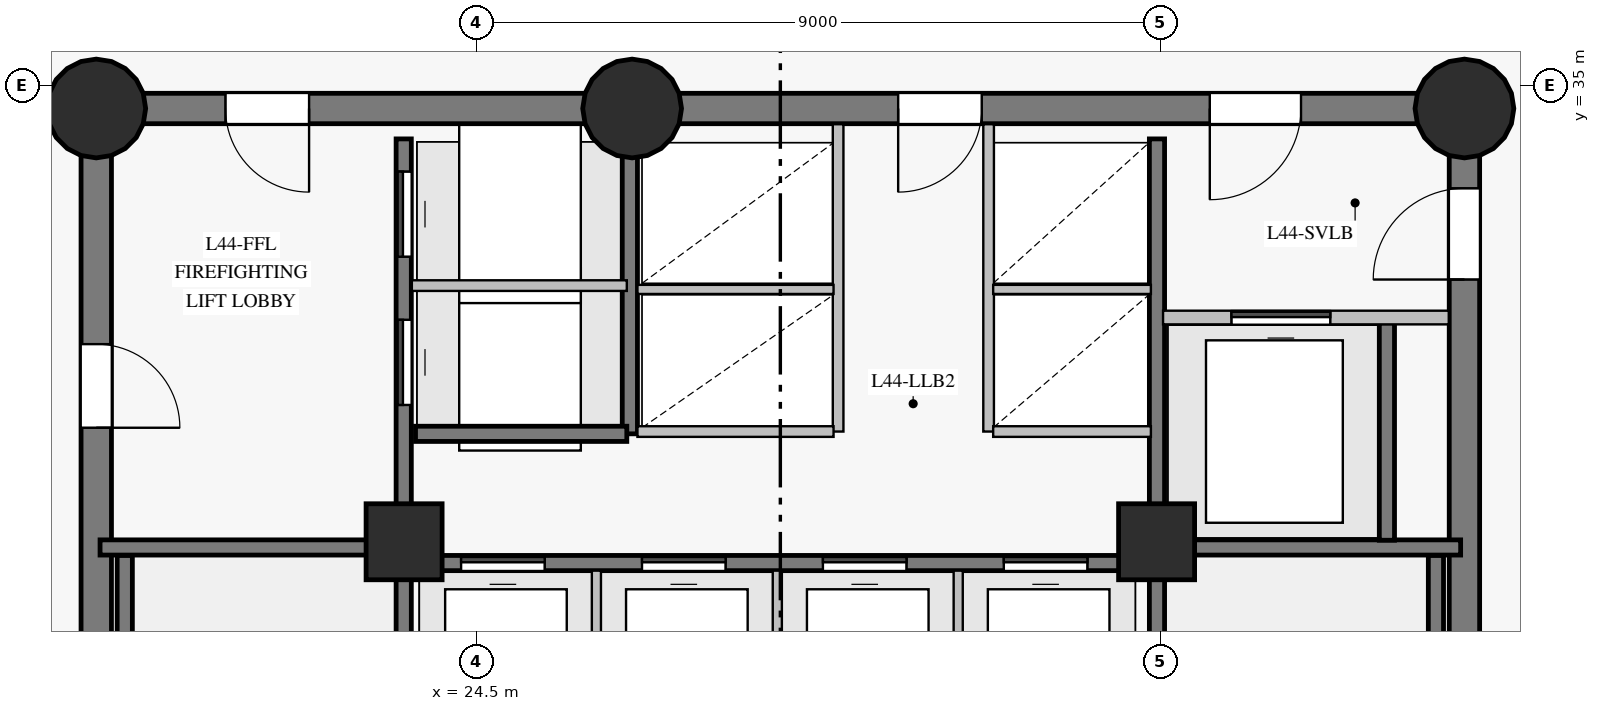
"""IFC4 building model, lengths in metres.
Left out: names, types, materials, properties, quantities, classifications, styles, units other than length and angle.
Written with IfcOpenShell. Run it as: python <this file> out.ifc"""

import sys

from ifc_helpers import new_model, si_unit, direction, frame, frame_2d, origin, origin_with_axes, origin_2d, place, context, subcontext, project, spatial, rectangle, circle, extrude, source, transform, mapped, element, fill, save


model = new_model("IFC4")
c1 = context("Model", 3, precision=1e-05, world=origin(), true_north=direction((0.0, 1.0)))
c2 = subcontext(c1, "Body", "Model", "MODEL_VIEW")
j1 = project(units=[si_unit("LENGTHUNIT", "METRE"), si_unit("PLANEANGLEUNIT", "RADIAN")], contexts=[c1])
p1 = place(None, origin())
s1 = spatial("IfcSite", under=j1, at=p1, CompositionType="ELEMENT")
p2 = place(p1, origin())
s2 = spatial("IfcBuilding", under=s1, at=p2, CompositionType="ELEMENT")
p3 = place(p2, frame((0.0, 0.0, 156.55)))
s3 = spatial("IfcBuildingStorey", under=s2, at=p3, CompositionType="ELEMENT", Elevation=156.55)
p4 = place(p3, frame((37.5, 18.3, 0.0), z_axis=(0.0, 0.0, 1.0), x_axis=(0.0, 1.0, 0.0)))
e1 = element("IfcWall", 1, at=p4, inside=s3, PredefinedType="SHEAR", context=c2, shape_type="SweptSolid", body=[
    extrude(rectangle(XDim=16.4, YDim=0.4, at=frame_2d((8.2, 0.0))), origin(), (0.0, 0.0, 1.0), 2.825),
])
p5 = place(p4, frame((14.15, 0.0, 0.0)))
e2 = element("IfcOpeningElement", 2, at=p5, cuts=e1, PredefinedType="OPENING", context=c2, shape_type="SweptSolid", body=[
    extrude(rectangle(XDim=1.2, YDim=2.15, at=frame_2d((0.6, 1.075))), frame((0.0, 0.21, 0.0), z_axis=(0.0, -1.0, 0.0), x_axis=(1.0, 0.0, 0.0)), (0.0, 0.0, 1.0), 0.42),
])
p6 = place(p3, frame((37.5, 34.7, 0.0), z_axis=(0.0, 0.0, 1.0), x_axis=(-1.0, 0.0, 0.0)))
e3 = element("IfcWall", 3, at=p6, inside=s3, PredefinedType="SHEAR", context=c2, shape_type="SweptSolid", body=[
    extrude(rectangle(XDim=10.95, YDim=0.4, at=frame_2d((5.475, 0.0))), origin(), (0.0, 0.0, 1.0), 2.825),
])
p7 = place(p6, frame((2.15, 0.0, 0.0)))
e4 = element("IfcOpeningElement", 4, at=p7, cuts=e3, PredefinedType="OPENING", context=c2, shape_type="SweptSolid", body=[
    extrude(rectangle(XDim=1.2, YDim=2.15, at=frame_2d((0.6, 1.075))), frame((0.0, 0.21, 0.0), z_axis=(0.0, -1.0, 0.0), x_axis=(1.0, 0.0, 0.0)), (0.0, 0.0, 1.0), 0.42),
])
p8 = place(p6, frame((6.35, 0.0, 0.0)))
e5 = element("IfcOpeningElement", 5, at=p8, cuts=e3, PredefinedType="OPENING", context=c2, shape_type="SweptSolid", body=[
    extrude(rectangle(XDim=1.1, YDim=2.15, at=frame_2d((0.55, 1.075))), frame((0.0, 0.21, 0.0), z_axis=(0.0, -1.0, 0.0), x_axis=(1.0, 0.0, 0.0)), (0.0, 0.0, 1.0), 0.42),
])
p9 = place(p3, frame((26.55, 34.7, 0.0), z_axis=(0.0, 0.0, 1.0), x_axis=(-1.0, 0.0, 0.0)))
e6 = element("IfcWall", 6, at=p9, inside=s3, PredefinedType="SHEAR", context=c2, shape_type="SweptSolid", body=[
    extrude(rectangle(XDim=7.05, YDim=0.4, at=frame_2d((3.525, 0.0))), origin(), (0.0, 0.0, 1.0), 2.825),
])
p10 = place(p9, frame((4.25, 0.0, 0.0)))
e7 = element("IfcOpeningElement", 7, at=p10, cuts=e6, PredefinedType="OPENING", context=c2, shape_type="SweptSolid", body=[
    extrude(rectangle(XDim=1.1, YDim=2.15, at=frame_2d((0.55, 1.075))), frame((0.0, 0.21, 0.0), z_axis=(0.0, -1.0, 0.0), x_axis=(1.0, 0.0, 0.0)), (0.0, 0.0, 1.0), 0.42),
])
p11 = place(p3, frame((19.5, 34.7, 0.0), z_axis=(0.0, 0.0, 1.0), x_axis=(0.0, -1.0, 0.0)))
e8 = element("IfcWall", 8, at=p11, inside=s3, PredefinedType="SHEAR", context=c2, shape_type="SweptSolid", body=[
    extrude(rectangle(XDim=16.4, YDim=0.4, at=frame_2d((8.2, 0.0))), origin(), (0.0, 0.0, 1.0), 2.825),
])
p12 = place(p11, frame((3.1, 0.0, 0.0)))
e9 = element("IfcOpeningElement", 9, at=p12, cuts=e8, PredefinedType="OPENING", context=c2, shape_type="SweptSolid", body=[
    extrude(rectangle(XDim=1.1, YDim=2.15, at=frame_2d((0.55, 1.075))), frame((0.0, 0.21, 0.0), z_axis=(0.0, -1.0, 0.0), x_axis=(1.0, 0.0, 0.0)), (0.0, 0.0, 1.0), 0.42),
])
m1 = source(origin_with_axes(), c2, "Body", "SweptSolid", [
    extrude(circle(Radius=0.65, at=origin_2d()), origin(), (0.0, 0.0, 1.0), 3.05),
])
for number, where, z_axis, x_axis in (
    (10, (19.5, 34.7, 0.0), (0.0, 0.0, 1.0), (1.0, 0.0, 0.0)),
    (11, (26.55, 34.7, 0.0), (0.0, 0.0, 1.0), (1.0, 0.0, 0.0)),
    (12, (37.5, 34.7, 0.0), (0.0, 0.0, 1.0), (1.0, 0.0, 0.0)),
):
    element("IfcColumn", number, at=place(p3, frame(where, z_axis=z_axis, x_axis=x_axis)), inside=s3, PredefinedType="COLUMN", context=c2, shape_type="MappedRepresentation", body=[
        mapped(m1, transform((0.0, 0.0, 0.0), scale=1.0)),
    ])
m2 = source(origin_with_axes(), c2, "Body", "SweptSolid", [
    extrude(rectangle(XDim=1.0, YDim=1.0, at=origin_2d()), origin(), (0.0, 0.0, 1.0), 3.05),
])
for number, where, z_axis, x_axis in (
    (13, (23.55, 29.0, 0.0), (0.0, 0.0, 1.0), (1.0, 0.0, 0.0)),
    (14, (33.45, 29.0, 0.0), (0.0, 0.0, 1.0), (1.0, 0.0, 0.0)),
):
    element("IfcColumn", number, at=place(p3, frame(where, z_axis=z_axis, x_axis=x_axis)), inside=s3, PredefinedType="COLUMN", context=c2, shape_type="MappedRepresentation", body=[
        mapped(m2, transform((0.0, 0.0, 0.0), scale=1.0)),
    ])
p13 = place(p3, frame((23.545, 18.7, 0.0), z_axis=(0.0, 0.0, 1.0), x_axis=(0.0, 1.0, 0.0)))
e15 = element("IfcWall", 15, at=p13, inside=s3, PredefinedType="SHEAR", context=c2, shape_type="SweptSolid", body=[
    extrude(rectangle(XDim=15.6, YDim=0.2, at=frame_2d((7.8, 0.0))), origin(), (0.0, 0.0, 1.0), 2.825),
])
p14 = place(p13, frame((2.75, 0.0, 0.0)))
e16 = element("IfcOpeningElement", 16, at=p14, cuts=e15, PredefinedType="OPENING", context=c2, shape_type="SweptSolid", body=[
    extrude(rectangle(XDim=1.15, YDim=2.15, at=frame_2d((0.575, 1.075))), frame((0.0, 0.11, 0.0), z_axis=(0.0, -1.0, 0.0), x_axis=(1.0, 0.0, 0.0)), (0.0, 0.0, 1.0), 0.22),
])
p15 = place(p13, frame((0.14, 0.0, 0.0)))
e17 = element("IfcOpeningElement", 17, at=p15, cuts=e15, PredefinedType="OPENING", context=c2, shape_type="SweptSolid", body=[
    extrude(rectangle(XDim=0.88, YDim=2.1, at=frame_2d((0.44, 1.05))), frame((0.0, 0.11, 0.0), z_axis=(0.0, -1.0, 0.0), x_axis=(1.0, 0.0, 0.0)), (0.0, 0.0, 1.0), 0.22),
])
p16 = place(p13, frame((1.36, 0.0, 0.0)))
e18 = element("IfcOpeningElement", 18, at=p16, cuts=e15, PredefinedType="OPENING", context=c2, shape_type="SweptSolid", body=[
    extrude(rectangle(XDim=0.88, YDim=2.1, at=frame_2d((0.44, 1.05))), frame((0.0, 0.11, 0.0), z_axis=(0.0, -1.0, 0.0), x_axis=(1.0, 0.0, 0.0)), (0.0, 0.0, 1.0), 0.22),
])
p17 = place(p13, frame((12.1, 0.0, 0.0)))
e19 = element("IfcOpeningElement", 19, at=p17, cuts=e15, PredefinedType="OPENING", context=c2, shape_type="SweptSolid", body=[
    extrude(rectangle(XDim=1.12, YDim=2.15, at=frame_2d((0.56, 1.075))), frame((0.0, 0.11, 0.0), z_axis=(0.0, -1.0, 0.0), x_axis=(1.0, 0.0, 0.0)), (0.0, 0.0, 1.0), 0.22),
])
p18 = place(p13, frame((14.05, 0.0, 0.0)))
e20 = element("IfcOpeningElement", 20, at=p18, cuts=e15, PredefinedType="OPENING", context=c2, shape_type="SweptSolid", body=[
    extrude(rectangle(XDim=1.12, YDim=2.15, at=frame_2d((0.56, 1.075))), frame((0.0, 0.11, 0.0), z_axis=(0.0, -1.0, 0.0), x_axis=(1.0, 0.0, 0.0)), (0.0, 0.0, 1.0), 0.22),
])
p19 = place(p3, frame((33.455, 18.7, 0.0), z_axis=(0.0, 0.0, 1.0), x_axis=(0.0, 1.0, 0.0)))
e21 = element("IfcWall", 21, at=p19, inside=s3, PredefinedType="SHEAR", context=c2, shape_type="SweptSolid", body=[
    extrude(rectangle(XDim=15.6, YDim=0.2, at=frame_2d((7.8, 0.0))), origin(), (0.0, 0.0, 1.0), 2.825),
])
p20 = place(p19, frame((2.75, 0.0, 0.0)))
e22 = element("IfcOpeningElement", 22, at=p20, cuts=e21, PredefinedType="OPENING", context=c2, shape_type="SweptSolid", body=[
    extrude(rectangle(XDim=1.15, YDim=2.15, at=frame_2d((0.575, 1.075))), frame((0.0, 0.11, 0.0), z_axis=(0.0, -1.0, 0.0), x_axis=(1.0, 0.0, 0.0)), (0.0, 0.0, 1.0), 0.22),
])
p21 = place(p19, frame((0.55, 0.0, 0.0)))
e23 = element("IfcOpeningElement", 23, at=p21, cuts=e21, PredefinedType="OPENING", context=c2, shape_type="SweptSolid", body=[
    extrude(rectangle(XDim=0.94, YDim=2.1, at=frame_2d((0.47, 1.05))), frame((0.0, 0.11, 0.0), z_axis=(0.0, -1.0, 0.0), x_axis=(1.0, 0.0, 0.0)), (0.0, 0.0, 1.0), 0.22),
])
p22 = place(p3, frame((23.7, 28.72, 0.0), z_axis=(0.0, 0.0, 1.0), x_axis=(1.0, 0.0, 0.0)))
e24 = element("IfcWall", 24, at=p22, inside=s3, PredefinedType="SHEAR", context=c2, shape_type="SweptSolid", body=[
    extrude(rectangle(XDim=9.6, YDim=0.2, at=frame_2d((4.8, 0.0))), origin(), (0.0, 0.0, 1.0), 2.825),
])
p23 = place(p22, frame((0.6, 0.0, 0.0)))
e25 = element("IfcOpeningElement", 25, at=p23, cuts=e24, PredefinedType="OPENING", context=c2, shape_type="SweptSolid", body=[
    extrude(rectangle(XDim=1.1, YDim=2.15, at=frame_2d((0.55, 1.075))), frame((0.0, 0.11, 0.0), z_axis=(0.0, -1.0, 0.0), x_axis=(1.0, 0.0, 0.0)), (0.0, 0.0, 1.0), 0.22),
])
p24 = place(p22, frame((2.98, 0.0, 0.0)))
e26 = element("IfcOpeningElement", 26, at=p24, cuts=e24, PredefinedType="OPENING", context=c2, shape_type="SweptSolid", body=[
    extrude(rectangle(XDim=1.1, YDim=2.15, at=frame_2d((0.55, 1.075))), frame((0.0, 0.11, 0.0), z_axis=(0.0, -1.0, 0.0), x_axis=(1.0, 0.0, 0.0)), (0.0, 0.0, 1.0), 0.22),
])
p25 = place(p22, frame((5.36, 0.0, 0.0)))
e27 = element("IfcOpeningElement", 27, at=p25, cuts=e24, PredefinedType="OPENING", context=c2, shape_type="SweptSolid", body=[
    extrude(rectangle(XDim=1.1, YDim=2.15, at=frame_2d((0.55, 1.075))), frame((0.0, 0.11, 0.0), z_axis=(0.0, -1.0, 0.0), x_axis=(1.0, 0.0, 0.0)), (0.0, 0.0, 1.0), 0.22),
])
p26 = place(p22, frame((7.74, 0.0, 0.0)))
e28 = element("IfcOpeningElement", 28, at=p26, cuts=e24, PredefinedType="OPENING", context=c2, shape_type="SweptSolid", body=[
    extrude(rectangle(XDim=1.1, YDim=2.15, at=frame_2d((0.55, 1.075))), frame((0.0, 0.11, 0.0), z_axis=(0.0, -1.0, 0.0), x_axis=(1.0, 0.0, 0.0)), (0.0, 0.0, 1.0), 0.22),
])
for number, where, z_axis, x_axis in (
    (29, (19.875, 21.32, 0.0), (0.0, 0.0, 1.0), (0.0, 1.0, 0.0)),
    (30, (37.125, 21.32, 0.0), (0.0, 0.0, 1.0), (0.0, 1.0, 0.0)),
):
    element("IfcWall", number, at=place(p3, frame(where, z_axis=z_axis, x_axis=x_axis)), inside=s3, PredefinedType="SHEAR", context=c2, shape_type="SweptSolid", body=[
        extrude(rectangle(XDim=7.5, YDim=0.2, at=frame_2d((3.75, 0.0))), origin(), (0.0, 0.0, 1.0), 2.825),
    ])
for number, where, z_axis, x_axis in (
    (31, (33.455, 28.925, 0.0), (0.0, 0.0, 1.0), (1.0, 0.0, 0.0)),
    (32, (19.55, 28.925, 0.0), (0.0, 0.0, 1.0), (1.0, 0.0, 0.0)),
):
    element("IfcWall", number, at=place(p3, frame(where, z_axis=z_axis, x_axis=x_axis)), inside=s3, PredefinedType="SHEAR", context=c2, shape_type="SweptSolid", body=[
        extrude(rectangle(XDim=3.995, YDim=0.2, at=frame_2d((1.998, 0.0))), origin(), (0.0, 0.0, 1.0), 2.825),
    ])
p27 = place(p3, frame((26.52, 30.42, 0.0), z_axis=(0.0, 0.0, 1.0), x_axis=(0.0, 1.0, 0.0)))
e33 = element("IfcWall", 33, at=p27, inside=s3, PredefinedType="SHEAR", context=c2, shape_type="SweptSolid", body=[
    extrude(rectangle(XDim=3.86, YDim=0.2, at=frame_2d((1.93, 0.0))), origin(), (0.0, 0.0, 1.0), 2.825),
])
p28 = place(p3, frame((36.48, 29.02, 0.0), z_axis=(0.0, 0.0, 1.0), x_axis=(0.0, 1.0, 0.0)))
e34 = element("IfcWall", 34, at=p28, inside=s3, PredefinedType="SHEAR", context=c2, shape_type="SweptSolid", body=[
    extrude(rectangle(XDim=2.86, YDim=0.2, at=frame_2d((1.43, 0.0))), origin(), (0.0, 0.0, 1.0), 2.825),
])
p29 = place(p3, frame((23.7, 30.42, 0.0), z_axis=(0.0, 0.0, 1.0), x_axis=(1.0, 0.0, 0.0)))
e35 = element("IfcWall", 35, at=p29, inside=s3, PredefinedType="SHEAR", context=c2, shape_type="SweptSolid", body=[
    extrude(rectangle(XDim=2.78, YDim=0.2, at=frame_2d((1.39, 0.0))), origin(), (0.0, 0.0, 1.0), 2.825),
])
for number, where, z_axis, x_axis in (
    (36, (29.26, 30.45, 0.0), (0.0, 0.0, 1.0), (0.0, 1.0, 0.0)),
    (37, (31.24, 30.45, 0.0), (0.0, 0.0, 1.0), (0.0, 1.0, 0.0)),
):
    element("IfcWall", number, at=place(p3, frame(where, z_axis=z_axis, x_axis=x_axis)), inside=s3, PredefinedType="PARTITIONING", context=c2, shape_type="SweptSolid", body=[
        extrude(rectangle(XDim=4.043, YDim=0.14, at=frame_2d((2.021, 0.0))), origin(), (0.0, 0.0, 1.0), 2.825),
    ])
p30 = place(p3, frame((33.535, 31.95, 0.0), z_axis=(0.0, 0.0, 1.0), x_axis=(1.0, 0.0, 0.0)))
e38 = element("IfcWall", 38, at=p30, inside=s3, PredefinedType="PARTITIONING", context=c2, shape_type="SweptSolid", body=[
    extrude(rectangle(XDim=3.759, YDim=0.18, at=frame_2d((1.879, 0.0))), origin(), (0.0, 0.0, 1.0), 2.825),
])
p31 = place(p30, frame((0.9, 0.0, 0.0)))
e39 = element("IfcOpeningElement", 39, at=p31, cuts=e38, PredefinedType="OPENING", context=c2, shape_type="SweptSolid", body=[
    extrude(rectangle(XDim=1.3, YDim=2.2, at=frame_2d((0.65, 1.1))), frame((0.0, 0.1, 0.0), z_axis=(0.0, -1.0, 0.0), x_axis=(1.0, 0.0, 0.0)), (0.0, 0.0, 1.0), 0.2),
])
p32 = place(p3, frame((23.652, 32.37, 0.0), z_axis=(0.0, 0.0, 1.0), x_axis=(1.0, 0.0, 0.0)))
e40 = element("IfcWall", 40, at=p32, inside=s3, PredefinedType="PARTITIONING", context=c2, shape_type="SweptSolid", body=[
    extrude(rectangle(XDim=2.828, YDim=0.14, at=frame_2d((1.414, 0.0))), origin(), (0.0, 0.0, 1.0), 2.825),
])
for number, where, z_axis, x_axis in (
    (41, (26.08, 26.02, 0.0), (0.0, 0.0, 1.0), (0.0, 1.0, 0.0)),
    (42, (28.46, 26.02, 0.0), (0.0, 0.0, 1.0), (0.0, 1.0, 0.0)),
    (43, (30.84, 26.02, 0.0), (0.0, 0.0, 1.0), (0.0, 1.0, 0.0)),
):
    element("IfcWall", number, at=place(p3, frame(where, z_axis=z_axis, x_axis=x_axis)), inside=s3, PredefinedType="PARTITIONING", context=c2, shape_type="SweptSolid", body=[
        extrude(rectangle(XDim=2.6, YDim=0.12, at=frame_2d((1.3, 0.0))), origin(), (0.0, 0.0, 1.0), 2.825),
    ])
p33 = place(p3, frame((26.62, 30.45, 0.0), z_axis=(0.0, 0.0, 1.0), x_axis=(1.0, 0.0, 0.0)))
e44 = element("IfcWall", 44, at=p33, inside=s3, PredefinedType="PARTITIONING", context=c2, shape_type="SweptSolid", body=[
    extrude(rectangle(XDim=2.58, YDim=0.14, at=frame_2d((1.29, 0.0))), origin(), (0.0, 0.0, 1.0), 2.825),
])
p34 = place(p3, frame((26.62, 32.32, 0.0), z_axis=(0.0, 0.0, 1.0), x_axis=(1.0, 0.0, 0.0)))
e45 = element("IfcWall", 45, at=p34, inside=s3, PredefinedType="PARTITIONING", context=c2, shape_type="SweptSolid", body=[
    extrude(rectangle(XDim=2.58, YDim=0.12, at=frame_2d((1.29, 0.0))), origin(), (0.0, 0.0, 1.0), 2.825),
])
p35 = place(p3, frame((31.3, 30.45, 0.0), z_axis=(0.0, 0.0, 1.0), x_axis=(1.0, 0.0, 0.0)))
e46 = element("IfcWall", 46, at=p35, inside=s3, PredefinedType="PARTITIONING", context=c2, shape_type="SweptSolid", body=[
    extrude(rectangle(XDim=2.075, YDim=0.14, at=frame_2d((1.038, 0.0))), origin(), (0.0, 0.0, 1.0), 2.825),
])
p36 = place(p3, frame((31.3, 32.32, 0.0), z_axis=(0.0, 0.0, 1.0), x_axis=(1.0, 0.0, 0.0)))
e47 = element("IfcWall", 47, at=p36, inside=s3, PredefinedType="PARTITIONING", context=c2, shape_type="SweptSolid", body=[
    extrude(rectangle(XDim=2.075, YDim=0.12, at=frame_2d((1.038, 0.0))), origin(), (0.0, 0.0, 1.0), 2.825),
])
m3 = source(origin_with_axes(), c2, "Body", "SweptSolid", [
    extrude(rectangle(XDim=1.1, YDim=2.15, at=frame_2d((0.55, 1.075))), frame((0.0, 0.025, 0.0), z_axis=(0.0, -1.0, 0.0), x_axis=(1.0, 0.0, 0.0)), (0.0, 0.0, 1.0), 0.05),
])
p37 = place(p10, origin())
e48 = element("IfcDoor", 48, at=p37, inside=s3, OperationType="SINGLE_SWING_LEFT", PredefinedType="DOOR", context=c2, shape_type="MappedRepresentation", body=[
    mapped(m3, transform((0.0, 0.0, 0.0), scale=1.0)),
])
fill(e7, e48)
p38 = place(p12, origin())
e49 = element("IfcDoor", 49, at=p38, inside=s3, OperationType="SINGLE_SWING_RIGHT", PredefinedType="DOOR", context=c2, shape_type="MappedRepresentation", body=[
    mapped(m3, transform((0.0, 0.0, 0.0), scale=1.0)),
])
fill(e9, e49)
m4 = source(origin_with_axes(), c2, "Body", "SweptSolid", [
    extrude(rectangle(XDim=1.2, YDim=2.15, at=frame_2d((0.6, 1.075))), frame((0.0, 0.025, 0.0), z_axis=(0.0, -1.0, 0.0), x_axis=(1.0, 0.0, 0.0)), (0.0, 0.0, 1.0), 0.05),
])
p39 = place(p5, origin())
e50 = element("IfcDoor", 50, at=p39, inside=s3, OperationType="SINGLE_SWING_LEFT", PredefinedType="DOOR", context=c2, shape_type="MappedRepresentation", body=[
    mapped(m4, transform((0.0, 0.0, 0.0), scale=1.0)),
])
fill(e2, e50)
p40 = place(p7, origin())
e51 = element("IfcDoor", 51, at=p40, inside=s3, OperationType="SINGLE_SWING_RIGHT", PredefinedType="DOOR", context=c2, shape_type="MappedRepresentation", body=[
    mapped(m4, transform((0.0, 0.0, 0.0), scale=1.0)),
])
fill(e4, e51)
m5 = source(origin_with_axes(), c2, "Body", "SweptSolid", [
    extrude(rectangle(XDim=1.3, YDim=2.2, at=frame_2d((0.65, 1.1))), frame((0.0, 0.025, 0.0), z_axis=(0.0, -1.0, 0.0), x_axis=(1.0, 0.0, 0.0)), (0.0, 0.0, 1.0), 0.05),
])
p41 = place(p31, origin())
e52 = element("IfcDoor", 52, at=p41, inside=s3, OperationType="SLIDING_TO_LEFT", PredefinedType="DOOR", context=c2, shape_type="MappedRepresentation", body=[
    mapped(m5, transform((0.0, 0.0, 0.0), scale=1.0)),
])
fill(e39, e52)
p42 = place(p23, origin())
e53 = element("IfcDoor", 53, at=p42, inside=s3, OperationType="SLIDING_TO_LEFT", PredefinedType="DOOR", context=c2, shape_type="MappedRepresentation", body=[
    mapped(m3, transform((0.0, 0.0, 0.0), scale=1.0)),
])
fill(e25, e53)
p43 = place(p24, origin())
e54 = element("IfcDoor", 54, at=p43, inside=s3, OperationType="SLIDING_TO_RIGHT", PredefinedType="DOOR", context=c2, shape_type="MappedRepresentation", body=[
    mapped(m3, transform((0.0, 0.0, 0.0), scale=1.0)),
])
fill(e26, e54)
p44 = place(p25, origin())
e55 = element("IfcDoor", 55, at=p44, inside=s3, OperationType="SLIDING_TO_LEFT", PredefinedType="DOOR", context=c2, shape_type="MappedRepresentation", body=[
    mapped(m3, transform((0.0, 0.0, 0.0), scale=1.0)),
])
fill(e27, e55)
p45 = place(p26, origin())
e56 = element("IfcDoor", 56, at=p45, inside=s3, OperationType="SLIDING_TO_RIGHT", PredefinedType="DOOR", context=c2, shape_type="MappedRepresentation", body=[
    mapped(m3, transform((0.0, 0.0, 0.0), scale=1.0)),
])
fill(e28, e56)
p46 = place(p8, origin())
e57 = element("IfcDoor", 57, at=p46, inside=s3, OperationType="SINGLE_SWING_RIGHT", PredefinedType="DOOR", context=c2, shape_type="MappedRepresentation", body=[
    mapped(m3, transform((0.0, 0.0, 0.0), scale=1.0)),
])
fill(e5, e57)
m6 = source(origin_with_axes(), c2, "Body", "SweptSolid", [
    extrude(rectangle(XDim=1.12, YDim=2.15, at=frame_2d((0.56, 1.075))), frame((0.0, 0.025, 0.0), z_axis=(0.0, -1.0, 0.0), x_axis=(1.0, 0.0, 0.0)), (0.0, 0.0, 1.0), 0.05),
])
p47 = place(p17, origin())
e58 = element("IfcDoor", 58, at=p47, inside=s3, OperationType="SLIDING_TO_LEFT", PredefinedType="DOOR", context=c2, shape_type="MappedRepresentation", body=[
    mapped(m6, transform((0.0, 0.0, 0.0), scale=1.0)),
])
fill(e19, e58)
p48 = place(p18, origin())
e59 = element("IfcDoor", 59, at=p48, inside=s3, OperationType="SLIDING_TO_RIGHT", PredefinedType="DOOR", context=c2, shape_type="MappedRepresentation", body=[
    mapped(m6, transform((0.0, 0.0, 0.0), scale=1.0)),
])
fill(e20, e59)
save(model, sys.argv[1])
